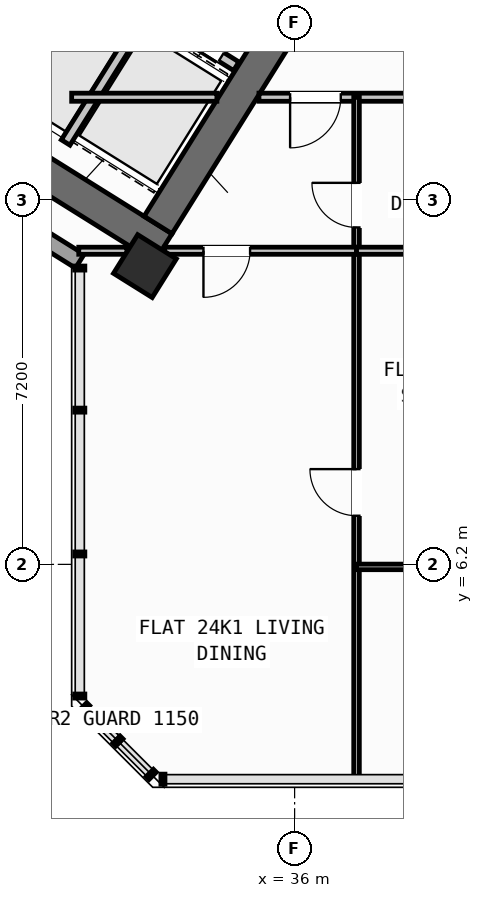
"""IFC4 building model, lengths in metres.
Left out: names, types, materials, properties, quantities, classifications, styles, units other than length and angle.
Written with IfcOpenShell. Run it as: python <this file> out.ifc"""

import sys

from ifc_helpers import new_model, si_unit, direction, frame, frame_2d, origin, origin_2d, place, context, subcontext, project, spatial, rectangle, hollow_rectangle, extrude, source, transform, mapped, element, fill, save


model = new_model("IFC4")
c1 = context("Model", 3, precision=1e-05, world=origin(), true_north=direction((0.0, 1.0)))
c2 = subcontext(c1, "Body", "Model", "MODEL_VIEW")
j1 = project(units=[si_unit("LENGTHUNIT", "METRE"), si_unit("PLANEANGLEUNIT", "RADIAN")], contexts=[c1])
p1 = place(None, origin())
s1 = spatial("IfcSite", under=j1, at=p1, CompositionType="ELEMENT")
p2 = place(p1, origin())
s2 = spatial("IfcBuilding", under=s1, at=p2, CompositionType="ELEMENT")
p3 = place(p2, frame((0.0, 0.0, 97.2)))
s3 = spatial("IfcBuildingStorey", under=s2, at=p3, CompositionType="ELEMENT", Elevation=97.2)
p4 = place(p3, frame((33.409, 12.45, 0.0), z_axis=(0.0, 0.0, 1.0), x_axis=(-0.848051132073, 0.529914405721, 0.0)))
e1 = element("IfcWall", 1, at=p4, inside=s3, PredefinedType="SHEAR", context=c2, shape_type="SweptSolid", body=[
    extrude(rectangle(XDim=13.24, YDim=0.65, at=frame_2d((6.62, 0.0))), origin(), (0.0, 0.0, 1.0), 3.32),
])
p5 = place(p3, frame((36.683, 18.304, 0.0), z_axis=(0.0, 0.0, 1.0), x_axis=(-0.529899109053, -0.848060690178, 0.0)))
e2 = element("IfcWall", 2, at=p5, inside=s3, PredefinedType="SHEAR", context=c2, shape_type="SweptSolid", body=[
    extrude(rectangle(XDim=6.375, YDim=0.65, at=frame_2d((3.188, 0.0))), origin(), (0.0, 0.0, 1.0), 3.32),
])
m1 = source(origin(), c2, "Body", "SweptSolid", [
    extrude(hollow_rectangle(XDim=0.9, YDim=0.9, WallThickness=0.036, at=origin_2d()), origin(), (0.0, 0.0, 1.0), 3.6),
])
p6 = place(p3, frame((33.046, 12.087, 0.0), z_axis=(0.0, 0.0, 1.0), x_axis=(-0.848048096156, 0.529919264233, 0.0)))
e3 = element("IfcColumn", 3, at=p6, inside=s3, PredefinedType="COLUMN", context=c2, shape_type="MappedRepresentation", body=[
    mapped(m1, transform((0.0, 0.0, 0.0), scale=1.0)),
])
p7 = place(p3, frame((31.76, 12.183, 0.0), z_axis=(0.0, 0.0, 1.0), x_axis=(-0.848047074256, 0.529920899612, 0.0)))
e4 = element("IfcWall", 4, at=p7, inside=s3, PredefinedType="STANDARD", context=c2, shape_type="SweptSolid", body=[
    extrude(rectangle(XDim=30.652, YDim=0.32, at=frame_2d((15.326, 0.0))), origin(), (0.0, 0.0, 1.0), 3.32),
])
p8 = place(p7, frame((15.153, 0.0, 0.0)))
e5 = element("IfcOpeningElement", 5, at=p8, cuts=e4, PredefinedType="OPENING", context=c2, shape_type="SweptSolid", body=[
    extrude(rectangle(XDim=1.2, YDim=2.15, at=frame_2d((0.6, 1.075))), frame((0.0, 0.17, 0.0), z_axis=(0.0, -1.0, 0.0), x_axis=(1.0, 0.0, 0.0)), (0.0, 0.0, 1.0), 0.34),
])
p9 = place(p7, frame((2.002, 0.0, 0.8)))
e6 = element("IfcOpeningElement", 6, at=p9, cuts=e4, PredefinedType="OPENING", context=c2, shape_type="SweptSolid", body=[
    extrude(rectangle(XDim=2.1, YDim=1.55, at=frame_2d((1.05, 0.775))), frame((0.0, 0.17, 0.0), z_axis=(0.0, -1.0, 0.0), x_axis=(1.0, 0.0, 0.0)), (0.0, 0.0, 1.0), 0.34),
])
p10 = place(p7, frame((7.206, 0.0, 0.8)))
e7 = element("IfcOpeningElement", 7, at=p10, cuts=e4, PredefinedType="OPENING", context=c2, shape_type="SweptSolid", body=[
    extrude(rectangle(XDim=2.1, YDim=1.55, at=frame_2d((1.05, 0.775))), frame((0.0, 0.17, 0.0), z_axis=(0.0, -1.0, 0.0), x_axis=(1.0, 0.0, 0.0)), (0.0, 0.0, 1.0), 0.34),
])
p11 = place(p7, frame((12.648, 0.0, 1.0)))
e8 = element("IfcOpeningElement", 8, at=p11, cuts=e4, PredefinedType="OPENING", context=c2, shape_type="SweptSolid", body=[
    extrude(rectangle(XDim=0.9, YDim=1.25, at=frame_2d((0.45, 0.625))), frame((0.0, 0.17, 0.0), z_axis=(0.0, -1.0, 0.0), x_axis=(1.0, 0.0, 0.0)), (0.0, 0.0, 1.0), 0.34),
])
p12 = place(p7, frame((27.974, 0.0, 0.95)))
e9 = element("IfcOpeningElement", 9, at=p12, cuts=e4, PredefinedType="OPENING", context=c2, shape_type="SweptSolid", body=[
    extrude(rectangle(XDim=1.2, YDim=1.4, at=frame_2d((0.6, 0.7))), frame((0.0, 0.17, 0.0), z_axis=(0.0, -1.0, 0.0), x_axis=(1.0, 0.0, 0.0)), (0.0, 0.0, 1.0), 0.34),
])
p13 = place(p7, frame((18.347, 0.0, 1.0)))
e10 = element("IfcOpeningElement", 10, at=p13, cuts=e4, PredefinedType="OPENING", context=c2, shape_type="SweptSolid", body=[
    extrude(rectangle(XDim=0.9, YDim=1.25, at=frame_2d((0.45, 0.625))), frame((0.0, 0.17, 0.0), z_axis=(0.0, -1.0, 0.0), x_axis=(1.0, 0.0, 0.0)), (0.0, 0.0, 1.0), 0.34),
])
p14 = place(p7, frame((20.931, 0.0, 1.0)))
e11 = element("IfcOpeningElement", 11, at=p14, cuts=e4, PredefinedType="OPENING", context=c2, shape_type="SweptSolid", body=[
    extrude(rectangle(XDim=0.65, YDim=1.15, at=frame_2d((0.325, 0.575))), frame((0.0, 0.17, 0.0), z_axis=(0.0, -1.0, 0.0), x_axis=(1.0, 0.0, 0.0)), (0.0, 0.0, 1.0), 0.34),
])
p15 = place(p7, frame((22.938, 0.0, 1.0)))
e12 = element("IfcOpeningElement", 12, at=p15, cuts=e4, PredefinedType="OPENING", context=c2, shape_type="SweptSolid", body=[
    extrude(rectangle(XDim=0.9, YDim=1.25, at=frame_2d((0.45, 0.625))), frame((0.0, 0.17, 0.0), z_axis=(0.0, -1.0, 0.0), x_axis=(1.0, 0.0, 0.0)), (0.0, 0.0, 1.0), 0.34),
])
p16 = place(p7, frame((25.069, 0.0, 1.0)))
e13 = element("IfcOpeningElement", 13, at=p16, cuts=e4, PredefinedType="OPENING", context=c2, shape_type="SweptSolid", body=[
    extrude(rectangle(XDim=0.9, YDim=1.25, at=frame_2d((0.45, 0.625))), frame((0.0, 0.17, 0.0), z_axis=(0.0, -1.0, 0.0), x_axis=(1.0, 0.0, 0.0)), (0.0, 0.0, 1.0), 0.34),
])
p17 = place(p3, frame((31.288, 18.256, 0.0), z_axis=(0.0, 0.0, 1.0), x_axis=(-0.529943379326, -0.848033026897, 0.0)))
e14 = element("IfcWall", 14, at=p17, inside=s3, PredefinedType="SHEAR", context=c2, shape_type="SweptSolid", body=[
    extrude(rectangle(XDim=3.16, YDim=0.26, at=frame_2d((1.58, 0.0))), origin(), (0.0, 0.0, 1.0), 3.32),
])
p18 = place(p3, frame((34.848, 16.031, 0.0), z_axis=(0.0, 0.0, 1.0), x_axis=(-0.848044042236, 0.529925751807, 0.0)))
e15 = element("IfcWall", 15, at=p18, inside=s3, PredefinedType="STANDARD", context=c2, shape_type="SweptSolid", body=[
    extrude(rectangle(XDim=4.198, YDim=0.2, at=frame_2d((2.099, 0.0))), origin(), (0.0, 0.0, 1.0), 3.31),
])
p19 = place(p18, frame((0.348, 0.0, 0.0)))
e16 = element("IfcOpeningElement", 16, at=p19, cuts=e15, PredefinedType="OPENING", context=c2, shape_type="SweptSolid", body=[
    extrude(rectangle(XDim=1.3, YDim=2.2, at=frame_2d((0.65, 1.1))), frame((0.0, 0.11, 0.0), z_axis=(0.0, -1.0, 0.0), x_axis=(1.0, 0.0, 0.0)), (0.0, 0.0, 1.0), 0.22),
])
p20 = place(p18, frame((2.423, 0.0, 0.0)))
e17 = element("IfcOpeningElement", 17, at=p20, cuts=e15, PredefinedType="OPENING", context=c2, shape_type="SweptSolid", body=[
    extrude(rectangle(XDim=1.45, YDim=2.25, at=frame_2d((0.725, 1.125))), frame((0.0, 0.11, 0.0), z_axis=(0.0, -1.0, 0.0), x_axis=(1.0, 0.0, 0.0)), (0.0, 0.0, 1.0), 0.22),
])
p21 = place(p3, frame((33.029, 17.003, 0.0), z_axis=(0.0, 0.0, 1.0), x_axis=(-0.529916267533, -0.848049968695, 0.0)))
e18 = element("IfcWall", 18, at=p21, inside=s3, PredefinedType="STANDARD", context=c2, shape_type="SweptSolid", body=[
    extrude(rectangle(XDim=2.92, YDim=0.2, at=frame_2d((1.46, 0.0))), origin(), (0.0, 0.0, 1.0), 3.31),
])
p22 = place(p3, frame((31.6, 15.42, 0.0), z_axis=(0.0, 0.0, 1.0), x_axis=(1.0, 0.0, 0.0)))
e19 = element("IfcWall", 19, at=p22, inside=s3, PredefinedType="PARTITIONING", context=c2, shape_type="SweptSolid", body=[
    extrude(rectangle(XDim=2.866, YDim=0.16, at=frame_2d((1.433, 0.0))), origin(), (0.0, 0.0, 1.0), 3.31),
])
p23 = place(p3, frame((35.296, 15.42, 0.0), z_axis=(0.0, 0.0, 1.0), x_axis=(1.0, 0.0, 0.0)))
e20 = element("IfcWall", 20, at=p23, inside=s3, PredefinedType="PARTITIONING", context=c2, shape_type="SweptSolid", body=[
    extrude(rectangle(XDim=15.311, YDim=0.16, at=frame_2d((7.655, 0.0))), origin(), (0.0, 0.0, 1.0), 3.31),
])
p24 = place(p23, frame((0.615, 0.0, 0.0)))
e21 = element("IfcOpeningElement", 21, at=p24, cuts=e20, PredefinedType="OPENING", context=c2, shape_type="SweptSolid", body=[
    extrude(rectangle(XDim=1.0, YDim=2.1, at=frame_2d((0.5, 1.05))), frame((0.0, 0.09, 0.0), z_axis=(0.0, -1.0, 0.0), x_axis=(1.0, 0.0, 0.0)), (0.0, 0.0, 1.0), 0.18),
])
p25 = place(p23, frame((9.035, 0.0, 0.0)))
e22 = element("IfcOpeningElement", 22, at=p25, cuts=e20, PredefinedType="OPENING", context=c2, shape_type="SweptSolid", body=[
    extrude(rectangle(XDim=1.0, YDim=2.1, at=frame_2d((0.5, 1.05))), frame((0.0, 0.09, 0.0), z_axis=(0.0, -1.0, 0.0), x_axis=(1.0, 0.0, 0.0)), (0.0, 0.0, 1.0), 0.18),
])
p26 = place(p3, frame((37.222, 1.96, 0.0), z_axis=(0.0, 0.0, 1.0), x_axis=(0.0, 1.0, 0.0)))
e23 = element("IfcWall", 23, at=p26, inside=s3, PredefinedType="PARTITIONING", context=c2, shape_type="SweptSolid", body=[
    extrude(rectangle(XDim=13.46, YDim=0.11, at=frame_2d((6.73, 0.0))), origin(), (0.0, 0.0, 1.0), 3.31),
])
p27 = place(p26, frame((5.2, 0.0, 0.0)))
e24 = element("IfcOpeningElement", 24, at=p27, cuts=e23, PredefinedType="OPENING", context=c2, shape_type="SweptSolid", body=[
    extrude(rectangle(XDim=0.92, YDim=2.08, at=frame_2d((0.46, 1.04))), frame((0.0, 0.065, 0.0), z_axis=(0.0, -1.0, 0.0), x_axis=(1.0, 0.0, 0.0)), (0.0, 0.0, 1.0), 0.13),
])
p28 = place(p26, frame((10.89, 0.0, 0.0)))
e25 = element("IfcOpeningElement", 25, at=p28, cuts=e23, PredefinedType="OPENING", context=c2, shape_type="SweptSolid", body=[
    extrude(rectangle(XDim=0.88, YDim=2.08, at=frame_2d((0.44, 1.04))), frame((0.0, 0.065, 0.0), z_axis=(0.0, -1.0, 0.0), x_axis=(1.0, 0.0, 0.0)), (0.0, 0.0, 1.0), 0.13),
])
p29 = place(p3, frame((31.74, 12.39, 0.0), z_axis=(0.0, 0.0, 1.0), x_axis=(1.0, 0.0, 0.0)))
e26 = element("IfcWall", 26, at=p29, inside=s3, PredefinedType="PLUMBINGWALL", context=c2, shape_type="SweptSolid", body=[
    extrude(rectangle(XDim=0.951, YDim=0.14, at=frame_2d((0.475, 0.0))), origin(), (0.0, 0.0, 1.0), 3.31),
])
p30 = place(p3, frame((33.433, 12.39, 0.0), z_axis=(0.0, 0.0, 1.0), x_axis=(1.0, 0.0, 0.0)))
e27 = element("IfcWall", 27, at=p30, inside=s3, PredefinedType="PLUMBINGWALL", context=c2, shape_type="SweptSolid", body=[
    extrude(rectangle(XDim=3.789, YDim=0.14, at=frame_2d((1.895, 0.0))), origin(), (0.0, 0.0, 1.0), 2.495),
])
p31 = place(p30, frame((0.768, 0.0, 0.0)))
e28 = element("IfcOpeningElement", 28, at=p31, cuts=e27, PredefinedType="OPENING", context=c2, shape_type="SweptSolid", body=[
    extrude(rectangle(XDim=0.92, YDim=2.08, at=frame_2d((0.46, 1.04))), frame((0.0, 0.08, 0.0), z_axis=(0.0, -1.0, 0.0), x_axis=(1.0, 0.0, 0.0)), (0.0, 0.0, 1.0), 0.16),
])
p32 = place(p3, frame((37.222, 12.39, 0.0), z_axis=(0.0, 0.0, 1.0), x_axis=(1.0, 0.0, 0.0)))
e29 = element("IfcWall", 29, at=p32, inside=s3, PredefinedType="PLUMBINGWALL", context=c2, shape_type="SweptSolid", body=[
    extrude(rectangle(XDim=4.728, YDim=0.14, at=frame_2d((2.364, 0.0))), origin(), (0.0, 0.0, 1.0), 2.495),
])
p33 = place(p3, frame((37.222, 6.15, 0.0), z_axis=(0.0, 0.0, 1.0), x_axis=(1.0, 0.0, 0.0)))
e30 = element("IfcWall", 30, at=p33, inside=s3, PredefinedType="PARTITIONING", context=c2, shape_type="SweptSolid", body=[
    extrude(rectangle(XDim=4.728, YDim=0.11, at=frame_2d((2.364, 0.0))), origin(), (0.0, 0.0, 1.0), 3.31),
])
p34 = place(p33, frame((1.904, 0.0, 0.0)))
e31 = element("IfcOpeningElement", 31, at=p34, cuts=e30, PredefinedType="OPENING", context=c2, shape_type="SweptSolid", body=[
    extrude(rectangle(XDim=0.92, YDim=2.08, at=frame_2d((0.46, 1.04))), frame((0.0, 0.065, 0.0), z_axis=(0.0, -1.0, 0.0), x_axis=(1.0, 0.0, 0.0)), (0.0, 0.0, 1.0), 0.13),
])
m2 = source(origin(), c2, "Body", "SweptSolid", [
    extrude(rectangle(XDim=1.3, YDim=2.2, at=frame_2d((0.65, 1.1))), frame((0.0, 0.025, 0.0), z_axis=(0.0, -1.0, 0.0), x_axis=(1.0, 0.0, 0.0)), (0.0, 0.0, 1.0), 0.05),
])
p35 = place(p19, origin())
e32 = element("IfcDoor", 32, at=p35, inside=s3, OperationType="DOUBLE_DOOR_SLIDING", PredefinedType="DOOR", context=c2, shape_type="MappedRepresentation", body=[
    mapped(m2, transform((0.0, 0.0, 0.0), scale=1.0)),
])
fill(e16, e32)
m3 = source(origin(), c2, "Body", "SweptSolid", [
    extrude(rectangle(XDim=0.92, YDim=2.08, at=frame_2d((0.46, 1.04))), frame((0.0, 0.025, 0.0), z_axis=(0.0, -1.0, 0.0), x_axis=(1.0, 0.0, 0.0)), (0.0, 0.0, 1.0), 0.05),
])
p36 = place(p27, origin())
e33 = element("IfcDoor", 33, at=p36, inside=s3, OperationType="SINGLE_SWING_RIGHT", PredefinedType="DOOR", context=c2, shape_type="MappedRepresentation", body=[
    mapped(m3, transform((0.0, 0.0, 0.0), scale=1.0)),
])
fill(e24, e33)
m4 = source(origin(), c2, "Body", "SweptSolid", [
    extrude(rectangle(XDim=1.0, YDim=2.1, at=frame_2d((0.5, 1.05))), frame((0.0, 0.025, 0.0), z_axis=(0.0, -1.0, 0.0), x_axis=(1.0, 0.0, 0.0)), (0.0, 0.0, 1.0), 0.05),
])
p37 = place(p24, frame((1.0, 0.0, 0.0), z_axis=(0.0, 0.0, 1.0), x_axis=(-1.0, 0.0, 0.0)))
e34 = element("IfcDoor", 34, at=p37, inside=s3, OperationType="SINGLE_SWING_RIGHT", PredefinedType="DOOR", context=c2, shape_type="MappedRepresentation", body=[
    mapped(m4, transform((0.0, 0.0, 0.0), scale=1.0)),
])
fill(e21, e34)
p38 = place(p31, frame((0.92, 0.0, 0.0), z_axis=(0.0, 0.0, 1.0), x_axis=(-1.0, 0.0, 0.0)))
e35 = element("IfcDoor", 35, at=p38, inside=s3, OperationType="SINGLE_SWING_RIGHT", PredefinedType="DOOR", context=c2, shape_type="MappedRepresentation", body=[
    mapped(m3, transform((0.0, 0.0, 0.0), scale=1.0)),
])
fill(e28, e35)
m5 = source(origin(), c2, "Body", "SweptSolid", [
    extrude(rectangle(XDim=0.88, YDim=2.08, at=frame_2d((0.44, 1.04))), frame((0.0, 0.025, 0.0), z_axis=(0.0, -1.0, 0.0), x_axis=(1.0, 0.0, 0.0)), (0.0, 0.0, 1.0), 0.05),
])
p39 = place(p28, origin())
e36 = element("IfcDoor", 36, at=p39, inside=s3, OperationType="SINGLE_SWING_RIGHT", PredefinedType="DOOR", context=c2, shape_type="MappedRepresentation", body=[
    mapped(m5, transform((0.0, 0.0, 0.0), scale=1.0)),
])
fill(e25, e36)
save(model, sys.argv[1])
